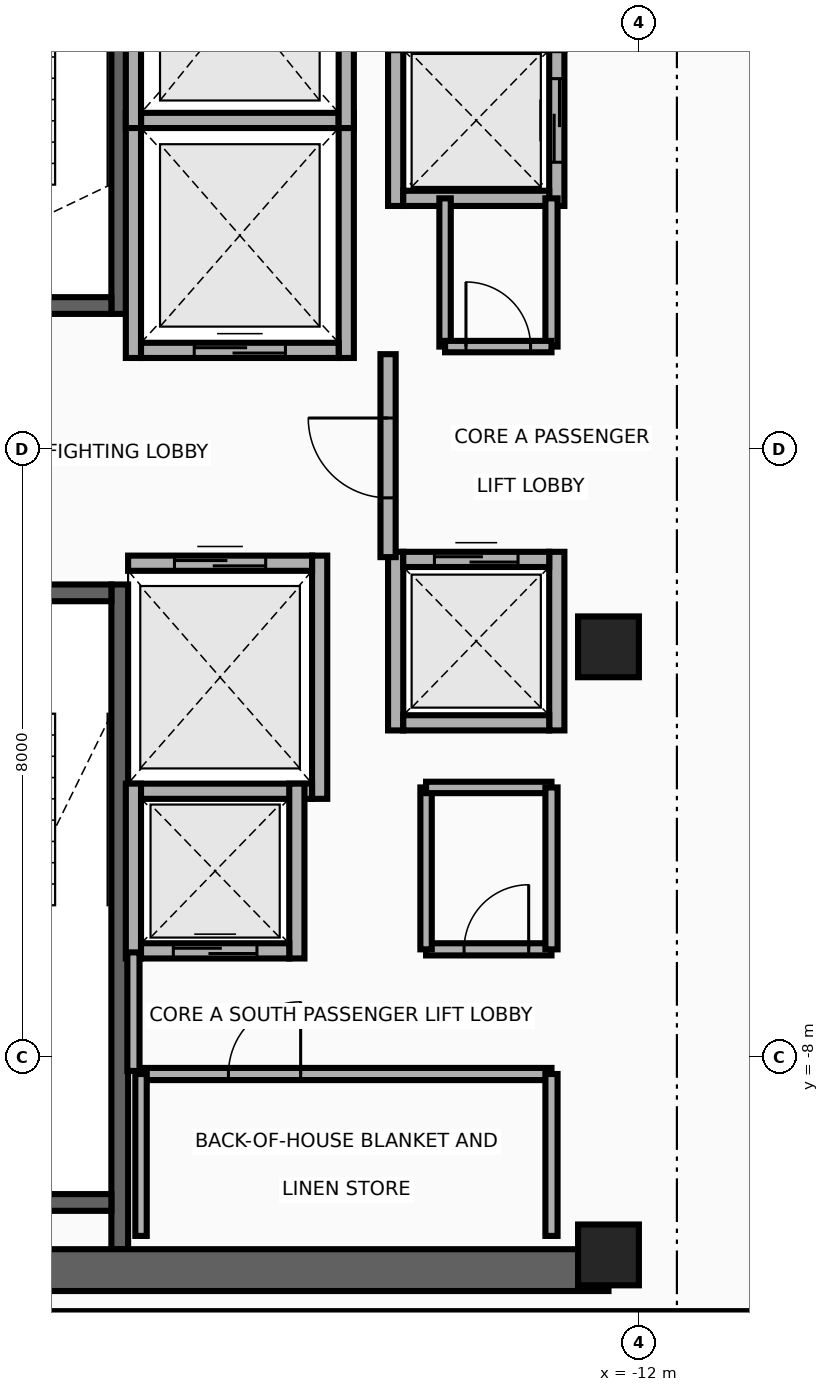
"""IFC4 building model, lengths in metres.
Left out: names, types, materials, properties, quantities, classifications, styles, units other than length and angle.
Written with IfcOpenShell. Run it as: python <this file> out.ifc"""

import sys

from ifc_helpers import new_model, si_unit, direction, frame, frame_2d, origin, origin_2d, place, context, subcontext, project, spatial, rectangle, extrude, source, transform, mapped, element, fill, save


model = new_model("IFC4")
c1 = context("Model", 3, precision=1e-05, world=origin(), true_north=direction((0.0, 1.0)))
c2 = subcontext(c1, "Body", "Model", "MODEL_VIEW")
j1 = project(units=[si_unit("LENGTHUNIT", "METRE"), si_unit("PLANEANGLEUNIT", "RADIAN")], contexts=[c1])
p1 = place(None, origin())
s1 = spatial("IfcSite", under=j1, at=p1, CompositionType="ELEMENT")
p2 = place(p1, origin())
s2 = spatial("IfcBuilding", under=s1, at=p2, CompositionType="ELEMENT")
p3 = place(p2, frame((0.0, 0.0, 283.5)))
s3 = spatial("IfcBuildingStorey", under=s2, at=p3, CompositionType="ELEMENT", Elevation=283.5)
p4 = place(p3, frame((-18.83, 1.78, 0.0), z_axis=(0.0, 0.0, 1.0), x_axis=(0.0, 1.0, 0.0)))
e1 = element("IfcWall", 1, at=p4, inside=s3, PredefinedType="SHEAR", context=c2, shape_type="SweptSolid", body=[
    extrude(rectangle(XDim=8.745, YDim=0.22, at=frame_2d((4.373, 0.0))), origin(), (0.0, 0.0, 1.0), 3.26),
])
p5 = place(p3, frame((-22.05, 1.89, 0.0), z_axis=(0.0, 0.0, 1.0), x_axis=(1.0, 0.0, 0.0)))
e2 = element("IfcWall", 2, at=p5, inside=s3, PredefinedType="SHEAR", context=c2, shape_type="SweptSolid", body=[
    extrude(rectangle(XDim=3.11, YDim=0.22, at=frame_2d((1.555, 0.0))), origin(), (0.0, 0.0, 1.0), 3.26),
])
p6 = place(p5, frame((1.0, 0.0, 0.0)))
e3 = element("IfcOpeningElement", 3, at=p6, cuts=e2, PredefinedType="OPENING", context=c2, shape_type="SweptSolid", body=[
    extrude(rectangle(XDim=1.1, YDim=2.15, at=frame_2d((0.55, 1.075))), frame((0.0, 0.125, 0.0), z_axis=(0.0, -1.0, 0.0), x_axis=(1.0, 0.0, 0.0)), (0.0, 0.0, 1.0), 0.25),
])
p7 = place(p3, frame((-18.83, -10.525, 0.0), z_axis=(0.0, 0.0, 1.0), x_axis=(0.0, 1.0, 0.0)))
e4 = element("IfcWall", 4, at=p7, inside=s3, PredefinedType="SHEAR", context=c2, shape_type="SweptSolid", body=[
    extrude(rectangle(XDim=8.745, YDim=0.22, at=frame_2d((4.373, 0.0))), origin(), (0.0, 0.0, 1.0), 3.26),
])
p8 = place(p3, frame((-22.05, -9.91, 0.0), z_axis=(0.0, 0.0, 1.0), x_axis=(1.0, 0.0, 0.0)))
e5 = element("IfcWall", 5, at=p8, inside=s3, PredefinedType="SHEAR", context=c2, shape_type="SweptSolid", body=[
    extrude(rectangle(XDim=3.11, YDim=0.22, at=frame_2d((1.555, 0.0))), origin(), (0.0, 0.0, 1.0), 3.26),
])
p9 = place(p3, frame((-22.05, -1.89, 0.0), z_axis=(0.0, 0.0, 1.0), x_axis=(1.0, 0.0, 0.0)))
e6 = element("IfcWall", 6, at=p9, inside=s3, PredefinedType="SHEAR", context=c2, shape_type="SweptSolid", body=[
    extrude(rectangle(XDim=3.11, YDim=0.22, at=frame_2d((1.555, 0.0))), origin(), (0.0, 0.0, 1.0), 3.26),
])
p10 = place(p9, frame((1.0, 0.0, 0.0)))
e7 = element("IfcOpeningElement", 7, at=p10, cuts=e6, PredefinedType="OPENING", context=c2, shape_type="SweptSolid", body=[
    extrude(rectangle(XDim=1.1, YDim=2.15, at=frame_2d((0.55, 1.075))), frame((0.0, 0.125, 0.0), z_axis=(0.0, -1.0, 0.0), x_axis=(1.0, 0.0, 0.0)), (0.0, 0.0, 1.0), 0.25),
])
p11 = place(p3, frame((-22.65, -10.8, 0.0), z_axis=(0.0, 0.0, 1.0), x_axis=(1.0, 0.0, 0.0)))
e8 = element("IfcWall", 8, at=p11, inside=s3, PredefinedType="SHEAR", context=c2, shape_type="SweptSolid", body=[
    extrude(rectangle(XDim=10.25, YDim=0.55, at=frame_2d((5.125, 0.0))), origin(), (0.0, 0.0, 1.0), 3.26),
])
m1 = source(origin(), c2, "Body", "SweptSolid", [
    extrude(rectangle(XDim=0.8, YDim=0.8, at=origin_2d()), origin(), (0.0, 0.0, 1.0), 3.5),
])
for number, where, z_axis, x_axis in (
    (9, (-12.4, -10.6, 0.0), (0.0, 0.0, 1.0), (1.0, 0.0, 0.0)),
    (10, (-12.4, -2.6, 0.0), (0.0, 0.0, 1.0), (1.0, 0.0, 0.0)),
):
    element("IfcColumn", number, at=place(p3, frame(where, z_axis=z_axis, x_axis=x_axis)), inside=s3, PredefinedType="COLUMN", context=c2, shape_type="MappedRepresentation", body=[
        mapped(m1, transform((0.0, 0.0, 0.0), x_axis=(1.0, 0.0, 0.0), y_axis=(0.0, 1.0, 0.0), z_axis=(0.0, 0.0, 1.0), scale=1.0)),
    ])
for number, where, z_axis, x_axis in (
    (11, (-18.65, 1.2, 0.0), (0.0, 0.0, 1.0), (0.0, 1.0, 0.0)),
    (12, (-15.85, 1.2, 0.0), (0.0, 0.0, 1.0), (0.0, 1.0, 0.0)),
):
    element("IfcWall", number, at=place(p3, frame(where, z_axis=z_axis, x_axis=x_axis)), inside=s3, PredefinedType="MOVABLE", context=c2, shape_type="SweptSolid", body=[
        extrude(rectangle(XDim=3.225, YDim=0.2, at=frame_2d((1.613, 0.0))), origin(), (0.0, 0.0, 1.0), 3.26),
    ])
p12 = place(p3, frame((-18.55, 1.3, 0.0), z_axis=(0.0, 0.0, 1.0), x_axis=(1.0, 0.0, 0.0)))
e13 = element("IfcWall", 13, at=p12, inside=s3, PredefinedType="MOVABLE", context=c2, shape_type="SweptSolid", body=[
    extrude(rectangle(XDim=2.6, YDim=0.2, at=frame_2d((1.3, 0.0))), origin(), (0.0, 0.0, 1.0), 3.26),
])
p13 = place(p12, frame((0.7, 0.0, 0.0)))
e14 = element("IfcOpeningElement", 14, at=p13, cuts=e13, PredefinedType="OPENING", context=c2, shape_type="SweptSolid", body=[
    extrude(rectangle(XDim=1.2, YDim=2.1, at=frame_2d((0.6, 1.05))), frame((0.0, 0.115, 0.0), z_axis=(0.0, -1.0, 0.0), x_axis=(1.0, 0.0, 0.0)), (0.0, 0.0, 1.0), 0.23),
])
p14 = place(p3, frame((-18.55, 4.325, 0.0), z_axis=(0.0, 0.0, 1.0), x_axis=(1.0, 0.0, 0.0)))
e15 = element("IfcWall", 15, at=p14, inside=s3, PredefinedType="MOVABLE", context=c2, shape_type="SweptSolid", body=[
    extrude(rectangle(XDim=2.6, YDim=0.2, at=frame_2d((1.3, 0.0))), origin(), (0.0, 0.0, 1.0), 3.26),
])
p15 = place(p3, frame((-16.2, -4.6, 0.0), z_axis=(0.0, 0.0, 1.0), x_axis=(0.0, 1.0, 0.0)))
e16 = element("IfcWall", 16, at=p15, inside=s3, PredefinedType="MOVABLE", context=c2, shape_type="SweptSolid", body=[
    extrude(rectangle(XDim=3.2, YDim=0.2, at=frame_2d((1.6, 0.0))), origin(), (0.0, 0.0, 1.0), 3.26),
])
p16 = place(p3, frame((-18.72, -4.5, 0.0), z_axis=(0.0, 0.0, 1.0), x_axis=(1.0, 0.0, 0.0)))
e17 = element("IfcWall", 17, at=p16, inside=s3, PredefinedType="MOVABLE", context=c2, shape_type="SweptSolid", body=[
    extrude(rectangle(XDim=2.42, YDim=0.2, at=frame_2d((1.21, 0.0))), origin(), (0.0, 0.0, 1.0), 3.26),
])
p17 = place(p3, frame((-18.72, -1.5, 0.0), z_axis=(0.0, 0.0, 1.0), x_axis=(1.0, 0.0, 0.0)))
e18 = element("IfcWall", 18, at=p17, inside=s3, PredefinedType="MOVABLE", context=c2, shape_type="SweptSolid", body=[
    extrude(rectangle(XDim=2.42, YDim=0.2, at=frame_2d((1.21, 0.0))), origin(), (0.0, 0.0, 1.0), 3.26),
])
p18 = place(p17, frame((0.61, 0.0, 0.0)))
e19 = element("IfcOpeningElement", 19, at=p18, cuts=e18, PredefinedType="OPENING", context=c2, shape_type="SweptSolid", body=[
    extrude(rectangle(XDim=1.2, YDim=2.1, at=frame_2d((0.6, 1.05))), frame((0.0, 0.115, 0.0), z_axis=(0.0, -1.0, 0.0), x_axis=(1.0, 0.0, 0.0)), (0.0, 0.0, 1.0), 0.23),
])
for number, where, z_axis, x_axis in (
    (20, (-18.65, 4.225, 0.0), (0.0, 0.0, 1.0), (0.0, 1.0, 0.0)),
    (21, (-15.85, 4.225, 0.0), (0.0, 0.0, 1.0), (0.0, 1.0, 0.0)),
):
    element("IfcWall", number, at=place(p3, frame(where, z_axis=z_axis, x_axis=x_axis)), inside=s3, PredefinedType="MOVABLE", context=c2, shape_type="SweptSolid", body=[
        extrude(rectangle(XDim=3.325, YDim=0.2, at=frame_2d((1.663, 0.0))), origin(), (0.0, 0.0, 1.0), 3.26),
    ])
p19 = place(p3, frame((-15.2, 3.2, 0.0), z_axis=(0.0, 0.0, 1.0), x_axis=(0.0, 1.0, 0.0)))
e22 = element("IfcWall", 22, at=p19, inside=s3, PredefinedType="MOVABLE", context=c2, shape_type="SweptSolid", body=[
    extrude(rectangle(XDim=2.25, YDim=0.2, at=frame_2d((1.125, 0.0))), origin(), (0.0, 0.0, 1.0), 3.26),
])
p20 = place(p3, frame((-13.08, 3.2, 0.0), z_axis=(0.0, 0.0, 1.0), x_axis=(0.0, 1.0, 0.0)))
e23 = element("IfcWall", 23, at=p20, inside=s3, PredefinedType="MOVABLE", context=c2, shape_type="SweptSolid", body=[
    extrude(rectangle(XDim=2.25, YDim=0.2, at=frame_2d((1.125, 0.0))), origin(), (0.0, 0.0, 1.0), 3.26),
])
p21 = place(p20, frame((0.575, 0.0, 0.0)))
e24 = element("IfcOpeningElement", 24, at=p21, cuts=e23, PredefinedType="OPENING", context=c2, shape_type="SweptSolid", body=[
    extrude(rectangle(XDim=1.1, YDim=2.1, at=frame_2d((0.55, 1.05))), frame((0.0, 0.115, 0.0), z_axis=(0.0, -1.0, 0.0), x_axis=(1.0, 0.0, 0.0)), (0.0, 0.0, 1.0), 0.23),
])
p22 = place(p3, frame((-15.1, 3.3, 0.0), z_axis=(0.0, 0.0, 1.0), x_axis=(1.0, 0.0, 0.0)))
e25 = element("IfcWall", 25, at=p22, inside=s3, PredefinedType="MOVABLE", context=c2, shape_type="SweptSolid", body=[
    extrude(rectangle(XDim=1.92, YDim=0.2, at=frame_2d((0.96, 0.0))), origin(), (0.0, 0.0, 1.0), 3.26),
])
for number, where, z_axis, x_axis in (
    (26, (-18.65, -6.7, 0.0), (0.0, 0.0, 1.0), (0.0, 1.0, 0.0)),
    (27, (-16.5, -6.7, 0.0), (0.0, 0.0, 1.0), (0.0, 1.0, 0.0)),
):
    element("IfcWall", number, at=place(p3, frame(where, z_axis=z_axis, x_axis=x_axis)), inside=s3, PredefinedType="MOVABLE", context=c2, shape_type="SweptSolid", body=[
        extrude(rectangle(XDim=2.3, YDim=0.2, at=frame_2d((1.15, 0.0))), origin(), (0.0, 0.0, 1.0), 3.26),
    ])
p23 = place(p3, frame((-18.55, -6.6, 0.0), z_axis=(0.0, 0.0, 1.0), x_axis=(1.0, 0.0, 0.0)))
e28 = element("IfcWall", 28, at=p23, inside=s3, PredefinedType="MOVABLE", context=c2, shape_type="SweptSolid", body=[
    extrude(rectangle(XDim=1.95, YDim=0.2, at=frame_2d((0.975, 0.0))), origin(), (0.0, 0.0, 1.0), 3.26),
])
p24 = place(p23, frame((0.425, 0.0, 0.0)))
e29 = element("IfcOpeningElement", 29, at=p24, cuts=e28, PredefinedType="OPENING", context=c2, shape_type="SweptSolid", body=[
    extrude(rectangle(XDim=1.1, YDim=2.1, at=frame_2d((0.55, 1.05))), frame((0.0, 0.115, 0.0), z_axis=(0.0, -1.0, 0.0), x_axis=(1.0, 0.0, 0.0)), (0.0, 0.0, 1.0), 0.23),
])
for number, where, z_axis, x_axis in (
    (30, (-15.2, -3.7, 0.0), (0.0, 0.0, 1.0), (0.0, 1.0, 0.0)),
    (31, (-13.08, -3.7, 0.0), (0.0, 0.0, 1.0), (0.0, 1.0, 0.0)),
):
    element("IfcWall", number, at=place(p3, frame(where, z_axis=z_axis, x_axis=x_axis)), inside=s3, PredefinedType="MOVABLE", context=c2, shape_type="SweptSolid", body=[
        extrude(rectangle(XDim=2.35, YDim=0.2, at=frame_2d((1.175, 0.0))), origin(), (0.0, 0.0, 1.0), 3.26),
    ])
p25 = place(p3, frame((-15.1, -3.6, 0.0), z_axis=(0.0, 0.0, 1.0), x_axis=(1.0, 0.0, 0.0)))
e32 = element("IfcWall", 32, at=p25, inside=s3, PredefinedType="MOVABLE", context=c2, shape_type="SweptSolid", body=[
    extrude(rectangle(XDim=1.92, YDim=0.2, at=frame_2d((0.96, 0.0))), origin(), (0.0, 0.0, 1.0), 3.26),
])
p26 = place(p3, frame((-15.1, -1.45, 0.0), z_axis=(0.0, 0.0, 1.0), x_axis=(1.0, 0.0, 0.0)))
e33 = element("IfcWall", 33, at=p26, inside=s3, PredefinedType="MOVABLE", context=c2, shape_type="SweptSolid", body=[
    extrude(rectangle(XDim=1.92, YDim=0.2, at=frame_2d((0.96, 0.0))), origin(), (0.0, 0.0, 1.0), 3.26),
])
p27 = place(p26, frame((0.41, 0.0, 0.0)))
e34 = element("IfcOpeningElement", 34, at=p27, cuts=e33, PredefinedType="OPENING", context=c2, shape_type="SweptSolid", body=[
    extrude(rectangle(XDim=1.1, YDim=2.1, at=frame_2d((0.55, 1.05))), frame((0.0, 0.115, 0.0), z_axis=(0.0, -1.0, 0.0), x_axis=(1.0, 0.0, 0.0)), (0.0, 0.0, 1.0), 0.23),
])
p28 = place(p3, frame((-15.3, -1.42, 0.0), z_axis=(0.0, 0.0, 1.0), x_axis=(0.0, 1.0, 0.0)))
e35 = element("IfcWall", 35, at=p28, inside=s3, PredefinedType="PARTITIONING", context=c2, shape_type="SweptSolid", body=[
    extrude(rectangle(XDim=2.67, YDim=0.2, at=frame_2d((1.335, 0.0))), origin(), (0.0, 0.0, 1.0), 3.26),
])
p29 = place(p28, frame((0.78, 0.0, 0.0)))
e36 = element("IfcOpeningElement", 36, at=p29, cuts=e35, PredefinedType="OPENING", context=c2, shape_type="SweptSolid", body=[
    extrude(rectangle(XDim=1.05, YDim=2.15, at=frame_2d((0.525, 1.075))), frame((0.0, 0.115, 0.0), z_axis=(0.0, -1.0, 0.0), x_axis=(1.0, 0.0, 0.0)), (0.0, 0.0, 1.0), 0.23),
])
p30 = place(p3, frame((-18.65, -8.18, 0.0), z_axis=(0.0, 0.0, 1.0), x_axis=(0.0, 1.0, 0.0)))
e37 = element("IfcWall", 37, at=p30, inside=s3, PredefinedType="PARTITIONING", context=c2, shape_type="SweptSolid", body=[
    extrude(rectangle(XDim=1.56, YDim=0.16, at=frame_2d((0.78, 0.0))), origin(), (0.0, 0.0, 1.0), 3.26),
])
p31 = place(p3, frame((-18.55, -8.22, 0.0), z_axis=(0.0, 0.0, 1.0), x_axis=(1.0, 0.0, 0.0)))
e38 = element("IfcWall", 38, at=p31, inside=s3, PredefinedType="PARTITIONING", context=c2, shape_type="SweptSolid", body=[
    extrude(rectangle(XDim=5.4, YDim=0.16, at=frame_2d((2.7, 0.0))), origin(), (0.0, 0.0, 1.0), 3.26),
])
p32 = place(p31, frame((1.15, 0.0, 0.0)))
e39 = element("IfcOpeningElement", 39, at=p32, cuts=e38, PredefinedType="OPENING", context=c2, shape_type="SweptSolid", body=[
    extrude(rectangle(XDim=0.95, YDim=2.15, at=frame_2d((0.475, 1.075))), frame((0.0, 0.095, 0.0), z_axis=(0.0, -1.0, 0.0), x_axis=(1.0, 0.0, 0.0)), (0.0, 0.0, 1.0), 0.19),
])
p33 = place(p3, frame((-18.55, -10.35, 0.0), z_axis=(0.0, 0.0, 1.0), x_axis=(0.0, 1.0, 0.0)))
e40 = element("IfcWall", 40, at=p33, inside=s3, PredefinedType="PARTITIONING", context=c2, shape_type="SweptSolid", body=[
    extrude(rectangle(XDim=2.13, YDim=0.15, at=frame_2d((1.065, 0.0))), origin(), (0.0, 0.0, 1.0), 3.26),
])
p34 = place(p3, frame((-13.15, -10.35, 0.0), z_axis=(0.0, 0.0, 1.0), x_axis=(0.0, 1.0, 0.0)))
e41 = element("IfcWall", 41, at=p34, inside=s3, PredefinedType="PARTITIONING", context=c2, shape_type="SweptSolid", body=[
    extrude(rectangle(XDim=2.13, YDim=0.16, at=frame_2d((1.065, 0.0))), origin(), (0.0, 0.0, 1.0), 3.26),
])
p35 = place(p3, frame((-14.8, -6.58, 0.0), z_axis=(0.0, 0.0, 1.0), x_axis=(1.0, 0.0, 0.0)))
e42 = element("IfcWall", 42, at=p35, inside=s3, PredefinedType="PARTITIONING", context=c2, shape_type="SweptSolid", body=[
    extrude(rectangle(XDim=1.65, YDim=0.16, at=frame_2d((0.825, 0.0))), origin(), (0.0, 0.0, 1.0), 3.26),
])
p36 = place(p35, frame((0.5, 0.0, 0.0)))
e43 = element("IfcOpeningElement", 43, at=p36, cuts=e42, PredefinedType="OPENING", context=c2, shape_type="SweptSolid", body=[
    extrude(rectangle(XDim=0.85, YDim=2.05, at=frame_2d((0.425, 1.025))), frame((0.0, 0.095, 0.0), z_axis=(0.0, -1.0, 0.0), x_axis=(1.0, 0.0, 0.0)), (0.0, 0.0, 1.0), 0.19),
])
p37 = place(p3, frame((-14.8, -6.58, 0.0), z_axis=(0.0, 0.0, 1.0), x_axis=(0.0, 1.0, 0.0)))
e44 = element("IfcWall", 44, at=p37, inside=s3, PredefinedType="PARTITIONING", context=c2, shape_type="SweptSolid", body=[
    extrude(rectangle(XDim=2.13, YDim=0.15, at=frame_2d((1.065, 0.0))), origin(), (0.0, 0.0, 1.0), 3.26),
])
p38 = place(p3, frame((-14.8, -4.45, 0.0), z_axis=(0.0, 0.0, 1.0), x_axis=(1.0, 0.0, 0.0)))
e45 = element("IfcWall", 45, at=p38, inside=s3, PredefinedType="PARTITIONING", context=c2, shape_type="SweptSolid", body=[
    extrude(rectangle(XDim=1.65, YDim=0.15, at=frame_2d((0.825, 0.0))), origin(), (0.0, 0.0, 1.0), 3.26),
])
p39 = place(p3, frame((-13.15, -6.58, 0.0), z_axis=(0.0, 0.0, 1.0), x_axis=(0.0, 1.0, 0.0)))
e46 = element("IfcWall", 46, at=p39, inside=s3, PredefinedType="PARTITIONING", context=c2, shape_type="SweptSolid", body=[
    extrude(rectangle(XDim=2.13, YDim=0.16, at=frame_2d((1.065, 0.0))), origin(), (0.0, 0.0, 1.0), 3.26),
])
p40 = place(p3, frame((-13.15, 1.35, 0.0), z_axis=(0.0, 0.0, 1.0), x_axis=(0.0, 1.0, 0.0)))
e47 = element("IfcWall", 47, at=p40, inside=s3, PredefinedType="PARTITIONING", context=c2, shape_type="SweptSolid", body=[
    extrude(rectangle(XDim=1.95, YDim=0.16, at=frame_2d((0.975, 0.0))), origin(), (0.0, 0.0, 1.0), 3.26),
])
p41 = place(p3, frame((-14.55, 1.35, 0.0), z_axis=(0.0, 0.0, 1.0), x_axis=(0.0, 1.0, 0.0)))
e48 = element("IfcWall", 48, at=p41, inside=s3, PredefinedType="PARTITIONING", context=c2, shape_type="SweptSolid", body=[
    extrude(rectangle(XDim=1.95, YDim=0.15, at=frame_2d((0.975, 0.0))), origin(), (0.0, 0.0, 1.0), 3.26),
])
p42 = place(p3, frame((-14.55, 1.35, 0.0), z_axis=(0.0, 0.0, 1.0), x_axis=(1.0, 0.0, 0.0)))
e49 = element("IfcWall", 49, at=p42, inside=s3, PredefinedType="PARTITIONING", context=c2, shape_type="SweptSolid", body=[
    extrude(rectangle(XDim=1.4, YDim=0.15, at=frame_2d((0.7, 0.0))), origin(), (0.0, 0.0, 1.0), 3.26),
])
p43 = place(p42, frame((0.275, 0.0, 0.0)))
e50 = element("IfcOpeningElement", 50, at=p43, cuts=e49, PredefinedType="OPENING", context=c2, shape_type="SweptSolid", body=[
    extrude(rectangle(XDim=0.85, YDim=2.05, at=frame_2d((0.425, 1.025))), frame((0.0, 0.09, 0.0), z_axis=(0.0, -1.0, 0.0), x_axis=(1.0, 0.0, 0.0)), (0.0, 0.0, 1.0), 0.18),
])
p44 = place(p3, frame((-23.45, -11.42, 0.0), z_axis=(0.0, 0.0, 1.0), x_axis=(1.0, 0.0, 0.0)))
e51 = element("IfcWall", 51, at=p44, inside=s3, PredefinedType="PARTITIONING", context=c2, shape_type="SweptSolid", body=[
    extrude(rectangle(XDim=13.84, YDim=0.16, at=frame_2d((6.92, 0.0))), origin(), (0.0, 0.0, 1.0), 2.634),
])
p45 = place(p13, origin())
e52 = element("IfcDoor", 52, at=p45, inside=s3, OperationType="DOUBLE_DOOR_SLIDING", PredefinedType="DOOR", context=c2, shape_type="SweptSolid", body=[
    extrude(rectangle(XDim=1.2, YDim=2.1, at=frame_2d((0.6, 1.05))), frame((0.0, 0.025, 0.0), z_axis=(0.0, -1.0, 0.0), x_axis=(1.0, 0.0, 0.0)), (0.0, 0.0, 1.0), 0.05),
])
fill(e14, e52)
p46 = place(p18, origin())
e53 = element("IfcDoor", 53, at=p46, inside=s3, OperationType="DOUBLE_DOOR_SLIDING", PredefinedType="DOOR", context=c2, shape_type="SweptSolid", body=[
    extrude(rectangle(XDim=1.2, YDim=2.1, at=frame_2d((0.6, 1.05))), frame((0.0, 0.025, 0.0), z_axis=(0.0, -1.0, 0.0), x_axis=(1.0, 0.0, 0.0)), (0.0, 0.0, 1.0), 0.05),
])
fill(e19, e53)
p47 = place(p21, origin())
e54 = element("IfcDoor", 54, at=p47, inside=s3, OperationType="DOUBLE_DOOR_SLIDING", PredefinedType="DOOR", context=c2, shape_type="SweptSolid", body=[
    extrude(rectangle(XDim=1.1, YDim=2.1, at=frame_2d((0.55, 1.05))), frame((0.0, 0.025, 0.0), z_axis=(0.0, -1.0, 0.0), x_axis=(1.0, 0.0, 0.0)), (0.0, 0.0, 1.0), 0.05),
])
fill(e24, e54)
p48 = place(p24, origin())
e55 = element("IfcDoor", 55, at=p48, inside=s3, OperationType="DOUBLE_DOOR_SLIDING", PredefinedType="DOOR", context=c2, shape_type="SweptSolid", body=[
    extrude(rectangle(XDim=1.1, YDim=2.1, at=frame_2d((0.55, 1.05))), frame((0.0, 0.025, 0.0), z_axis=(0.0, -1.0, 0.0), x_axis=(1.0, 0.0, 0.0)), (0.0, 0.0, 1.0), 0.05),
])
fill(e29, e55)
p49 = place(p27, origin())
e56 = element("IfcDoor", 56, at=p49, inside=s3, OperationType="DOUBLE_DOOR_SLIDING", PredefinedType="DOOR", context=c2, shape_type="SweptSolid", body=[
    extrude(rectangle(XDim=1.1, YDim=2.1, at=frame_2d((0.55, 1.05))), frame((0.0, 0.025, 0.0), z_axis=(0.0, -1.0, 0.0), x_axis=(1.0, 0.0, 0.0)), (0.0, 0.0, 1.0), 0.05),
])
fill(e34, e56)
p50 = place(p29, origin())
e57 = element("IfcDoor", 57, at=p50, inside=s3, OperationType="SINGLE_SWING_RIGHT", PredefinedType="DOOR", context=c2, shape_type="SweptSolid", body=[
    extrude(rectangle(XDim=1.05, YDim=2.15, at=frame_2d((0.525, 1.075))), frame((0.0, 0.025, 0.0), z_axis=(0.0, -1.0, 0.0), x_axis=(1.0, 0.0, 0.0)), (0.0, 0.0, 1.0), 0.05),
])
fill(e36, e57)
p51 = place(p32, origin())
e58 = element("IfcDoor", 58, at=p51, inside=s3, OperationType="SINGLE_SWING_RIGHT", PredefinedType="DOOR", context=c2, shape_type="SweptSolid", body=[
    extrude(rectangle(XDim=0.95, YDim=2.15, at=frame_2d((0.475, 1.075))), frame((0.0, 0.025, 0.0), z_axis=(0.0, -1.0, 0.0), x_axis=(1.0, 0.0, 0.0)), (0.0, 0.0, 1.0), 0.05),
])
fill(e39, e58)
p52 = place(p36, origin())
e59 = element("IfcDoor", 59, at=p52, inside=s3, OperationType="SINGLE_SWING_LEFT", PredefinedType="DOOR", context=c2, shape_type="SweptSolid", body=[
    extrude(rectangle(XDim=0.85, YDim=2.05, at=frame_2d((0.425, 1.025))), frame((0.0, 0.025, 0.0), z_axis=(0.0, -1.0, 0.0), x_axis=(1.0, 0.0, 0.0)), (0.0, 0.0, 1.0), 0.05),
])
fill(e43, e59)
p53 = place(p43, origin())
e60 = element("IfcDoor", 60, at=p53, inside=s3, OperationType="SINGLE_SWING_RIGHT", PredefinedType="DOOR", context=c2, shape_type="SweptSolid", body=[
    extrude(rectangle(XDim=0.85, YDim=2.05, at=frame_2d((0.425, 1.025))), frame((0.0, 0.025, 0.0), z_axis=(0.0, -1.0, 0.0), x_axis=(1.0, 0.0, 0.0)), (0.0, 0.0, 1.0), 0.05),
])
fill(e50, e60)
save(model, sys.argv[1])
